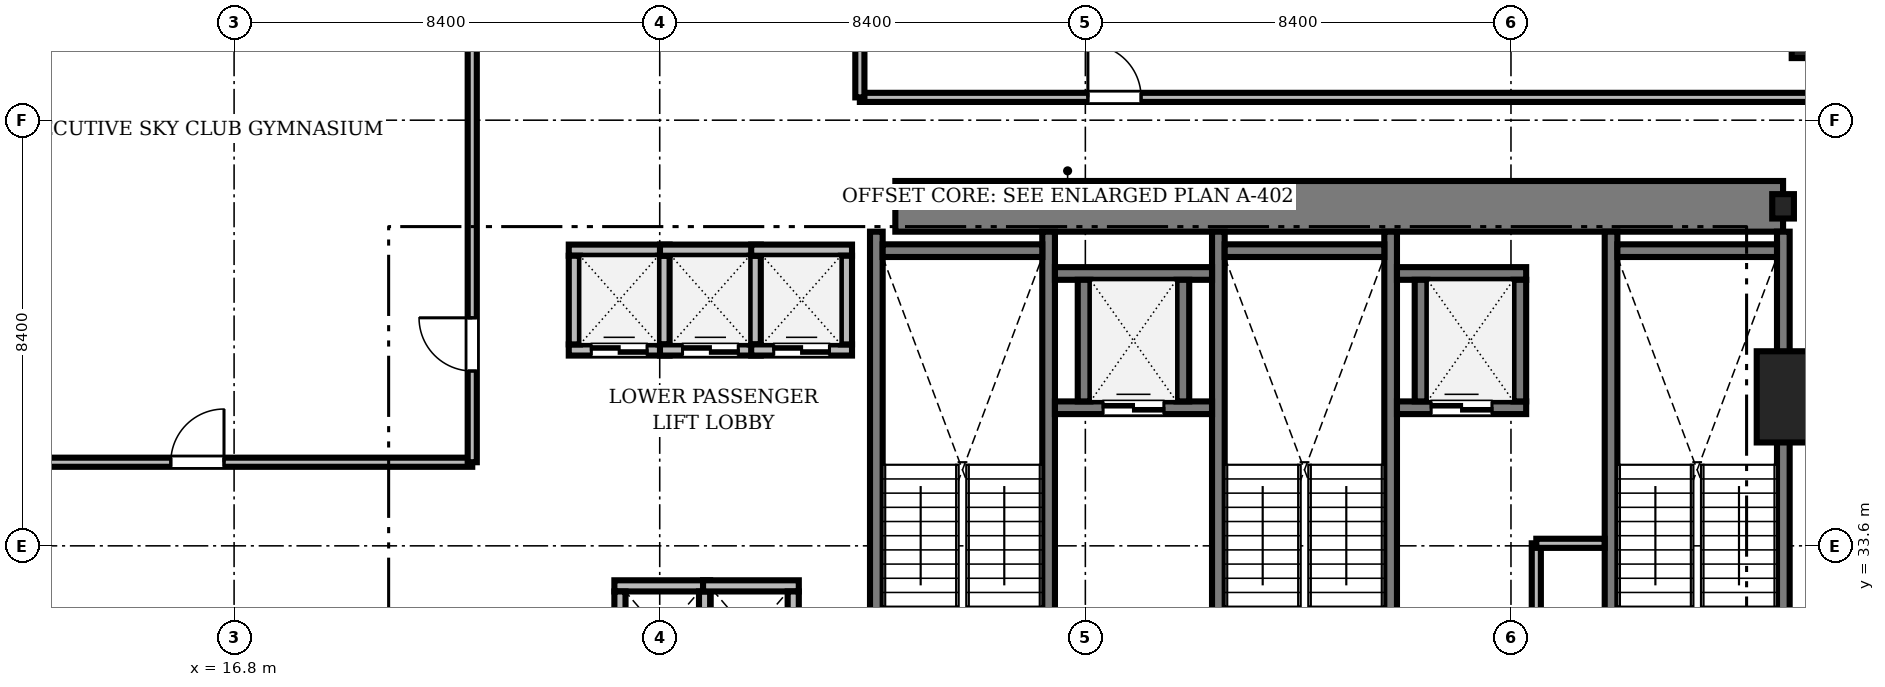
"""IFC4 building model, lengths in metres.
Left out: names, types, materials, properties, quantities, classifications, styles, units other than length and angle.
Written with IfcOpenShell. Run it as: python <this file> out.ifc"""

import sys

from ifc_helpers import new_model, si_unit, direction, frame, frame_2d, origin, origin_2d, place, context, subcontext, project, spatial, rectangle, i_section, extrude, source, transform, mapped, element, fill, save


model = new_model("IFC4")
c1 = context("Model", 3, precision=1e-05, world=origin(), true_north=direction((0.0, 1.0)))
c2 = subcontext(c1, "Body", "Model", "MODEL_VIEW")
j1 = project(units=[si_unit("LENGTHUNIT", "METRE"), si_unit("PLANEANGLEUNIT", "RADIAN")], contexts=[c1])
p1 = place(None, origin())
s1 = spatial("IfcSite", under=j1, at=p1, CompositionType="ELEMENT")
p2 = place(p1, origin())
s2 = spatial("IfcBuilding", under=s1, at=p2, CompositionType="ELEMENT")
p3 = place(p2, frame((0.0, 0.0, 71.4)))
s3 = spatial("IfcBuildingStorey", under=s2, at=p3, CompositionType="ELEMENT", Elevation=71.4)
m1 = source(origin(), c2, "Body", "SweptSolid", [
    extrude(rectangle(XDim=17.52, YDim=1.0, at=frame_2d((8.76, 0.0))), origin(), (0.0, 0.0, 1.0), 3.41),
])
p4 = place(p3, frame((29.85, 40.3, 0.0), z_axis=(0.0, 0.0, 1.0), x_axis=(1.0, 0.0, 0.0)))
e1 = element("IfcWall", 1, at=p4, inside=s3, PredefinedType="SHEAR", context=c2, shape_type="MappedRepresentation", body=[
    mapped(m1, transform((0.0, 0.0, 0.0), scale=1.0)),
])
m2 = source(origin(), c2, "Body", "SweptSolid", [
    extrude(i_section(OverallWidth=0.428, OverallDepth=0.481, WebThickness=0.04, FlangeThickness=0.063, FilletRadius=0.015, at=origin_2d()), origin(), (0.0, 0.0, 1.0), 3.41),
])
p5 = place(p3, frame((47.37, 40.3, 0.0), z_axis=(0.0, 0.0, 1.0), x_axis=(1.0, 0.0, 0.0)))
e2 = element("IfcColumn", 2, at=p5, inside=s3, PredefinedType="COLUMN", context=c2, shape_type="MappedRepresentation", body=[
    mapped(m2, transform((0.0, 0.0, 0.0), scale=1.0)),
])
m3 = source(origin(), c2, "Body", "SweptSolid", [
    extrude(rectangle(XDim=1.8, YDim=1.8, at=origin_2d()), origin(), (0.0, 0.0, 1.0), 3.41),
])
p6 = place(p3, frame((47.75, 36.54, 0.0), z_axis=(0.0, 0.0, 1.0), x_axis=(1.0, 0.0, 0.0)))
e3 = element("IfcColumn", 3, at=p6, inside=s3, PredefinedType="COLUMN", context=c2, shape_type="MappedRepresentation", body=[
    mapped(m3, transform((0.0, 0.0, 0.0), scale=1.0)),
])
m4 = source(origin(), c2, "Body", "SweptSolid", [
    extrude(i_section(OverallWidth=0.419, OverallDepth=0.449, WebThickness=0.031, FlangeThickness=0.048, FilletRadius=0.015, at=origin_2d()), origin(), (0.0, 0.0, 1.0), 3.41),
])
p7 = place(p3, frame((47.75, 43.45, 0.0), z_axis=(0.0, 0.0, 1.0), x_axis=(1.0, 0.0, 0.0)))
e4 = element("IfcColumn", 4, at=p7, inside=s3, PredefinedType="COLUMN", context=c2, shape_type="MappedRepresentation", body=[
    mapped(m4, transform((0.0, 0.0, 0.0), scale=1.0)),
])
m5 = source(origin(), c2, "Body", "SweptSolid", [
    extrude(rectangle(XDim=9.15, YDim=0.25, at=frame_2d((4.575, 0.0))), origin(), (0.0, 0.0, 1.0), 3.45),
])
for number, where, z_axis, x_axis in (
    (5, (29.475, 30.65, 0.0), (0.0, 0.0, 1.0), (0.0, 1.0, 0.0)),
    (6, (32.875, 30.65, 0.0), (0.0, 0.0, 1.0), (0.0, 1.0, 0.0)),
):
    element("IfcWall", number, at=place(p3, frame(where, z_axis=z_axis, x_axis=x_axis)), inside=s3, PredefinedType="SOLIDWALL", context=c2, shape_type="MappedRepresentation", body=[
        mapped(m5, transform((0.0, 0.0, 0.0), scale=1.0)),
    ])
m6 = source(origin(), c2, "Body", "SweptSolid", [
    extrude(rectangle(XDim=3.15, YDim=0.25, at=frame_2d((1.575, 0.0))), origin(), (0.0, 0.0, 1.0), 3.45),
])
p8 = place(p3, frame((29.6, 39.425, 0.0), z_axis=(0.0, 0.0, 1.0), x_axis=(1.0, 0.0, 0.0)))
e7 = element("IfcWall", 7, at=p8, inside=s3, PredefinedType="SOLIDWALL", context=c2, shape_type="MappedRepresentation", body=[
    mapped(m6, transform((0.0, 0.0, 0.0), scale=1.0)),
])
for number, where, z_axis, x_axis in (
    (8, (36.225, 30.65, 0.0), (0.0, 0.0, 1.0), (0.0, 1.0, 0.0)),
    (9, (39.625, 30.65, 0.0), (0.0, 0.0, 1.0), (0.0, 1.0, 0.0)),
):
    element("IfcWall", number, at=place(p3, frame(where, z_axis=z_axis, x_axis=x_axis)), inside=s3, PredefinedType="SOLIDWALL", context=c2, shape_type="MappedRepresentation", body=[
        mapped(m5, transform((0.0, 0.0, 0.0), scale=1.0)),
    ])
p9 = place(p3, frame((36.35, 39.425, 0.0), z_axis=(0.0, 0.0, 1.0), x_axis=(1.0, 0.0, 0.0)))
e10 = element("IfcWall", 10, at=p9, inside=s3, PredefinedType="SOLIDWALL", context=c2, shape_type="MappedRepresentation", body=[
    mapped(m6, transform((0.0, 0.0, 0.0), scale=1.0)),
])
for number, where, z_axis, x_axis in (
    (11, (43.975, 30.65, 0.0), (0.0, 0.0, 1.0), (0.0, 1.0, 0.0)),
    (12, (47.375, 30.65, 0.0), (0.0, 0.0, 1.0), (0.0, 1.0, 0.0)),
):
    element("IfcWall", number, at=place(p3, frame(where, z_axis=z_axis, x_axis=x_axis)), inside=s3, PredefinedType="SOLIDWALL", context=c2, shape_type="MappedRepresentation", body=[
        mapped(m5, transform((0.0, 0.0, 0.0), scale=1.0)),
    ])
p10 = place(p3, frame((44.1, 39.425, 0.0), z_axis=(0.0, 0.0, 1.0), x_axis=(1.0, 0.0, 0.0)))
e13 = element("IfcWall", 13, at=p10, inside=s3, PredefinedType="SOLIDWALL", context=c2, shape_type="MappedRepresentation", body=[
    mapped(m6, transform((0.0, 0.0, 0.0), scale=1.0)),
])
m7 = source(origin(), c2, "Body", "SweptSolid", [
    extrude(rectangle(XDim=1.99, YDim=0.22, at=frame_2d((0.995, 0.0))), origin(), (0.0, 0.0, 1.0), 3.41),
])
p11 = place(p3, frame((23.405, 37.465, 0.0), z_axis=(0.0, 0.0, 1.0), x_axis=(1.0, 0.0, 0.0)))
e14 = element("IfcWall", 14, at=p11, inside=s3, PredefinedType="SOLIDWALL", context=c2, shape_type="MappedRepresentation", body=[
    mapped(m7, transform((0.0, 0.0, 0.0), scale=1.0)),
])
m8 = source(origin(), c2, "Body", "SweptSolid", [
    extrude(rectangle(XDim=1.1, YDim=2.2, at=frame_2d((0.55, 1.1))), frame((0.0, 0.12, 0.0), z_axis=(0.0, -1.0, 0.0), x_axis=(1.0, 0.0, 0.0)), (0.0, 0.0, 1.0), 0.24),
])
p12 = place(p11, frame((0.445, 0.0, 0.0)))
e15 = element("IfcOpeningElement", 15, at=p12, cuts=e14, PredefinedType="OPENING", context=c2, shape_type="MappedRepresentation", body=[
    mapped(m8, transform((0.0, 0.0, 0.0), scale=1.0)),
])
p13 = place(p3, frame((23.405, 39.435, 0.0), z_axis=(0.0, 0.0, 1.0), x_axis=(1.0, 0.0, 0.0)))
e16 = element("IfcWall", 16, at=p13, inside=s3, PredefinedType="SOLIDWALL", context=c2, shape_type="MappedRepresentation", body=[
    mapped(m7, transform((0.0, 0.0, 0.0), scale=1.0)),
])
m9 = source(origin(), c2, "Body", "SweptSolid", [
    extrude(rectangle(XDim=1.75, YDim=0.22, at=frame_2d((0.875, 0.0))), origin(), (0.0, 0.0, 1.0), 3.41),
])
for number, where, z_axis, x_axis in (
    (17, (23.515, 37.575, 0.0), (0.0, 0.0, 1.0), (0.0, 1.0, 0.0)),
    (18, (25.285, 37.575, 0.0), (0.0, 0.0, 1.0), (0.0, 1.0, 0.0)),
):
    element("IfcWall", number, at=place(p3, frame(where, z_axis=z_axis, x_axis=x_axis)), inside=s3, PredefinedType="SOLIDWALL", context=c2, shape_type="MappedRepresentation", body=[
        mapped(m9, transform((0.0, 0.0, 0.0), scale=1.0)),
    ])
p14 = place(p3, frame((25.205, 37.465, 0.0), z_axis=(0.0, 0.0, 1.0), x_axis=(1.0, 0.0, 0.0)))
e19 = element("IfcWall", 19, at=p14, inside=s3, PredefinedType="SOLIDWALL", context=c2, shape_type="MappedRepresentation", body=[
    mapped(m7, transform((0.0, 0.0, 0.0), scale=1.0)),
])
p15 = place(p14, frame((0.445, 0.0, 0.0)))
e20 = element("IfcOpeningElement", 20, at=p15, cuts=e19, PredefinedType="OPENING", context=c2, shape_type="MappedRepresentation", body=[
    mapped(m8, transform((0.0, 0.0, 0.0), scale=1.0)),
])
p16 = place(p3, frame((25.205, 39.435, 0.0), z_axis=(0.0, 0.0, 1.0), x_axis=(1.0, 0.0, 0.0)))
e21 = element("IfcWall", 21, at=p16, inside=s3, PredefinedType="SOLIDWALL", context=c2, shape_type="MappedRepresentation", body=[
    mapped(m7, transform((0.0, 0.0, 0.0), scale=1.0)),
])
p17 = place(p3, frame((27.085, 37.575, 0.0), z_axis=(0.0, 0.0, 1.0), x_axis=(0.0, 1.0, 0.0)))
e22 = element("IfcWall", 22, at=p17, inside=s3, PredefinedType="SOLIDWALL", context=c2, shape_type="MappedRepresentation", body=[
    mapped(m9, transform((0.0, 0.0, 0.0), scale=1.0)),
])
m10 = source(origin(), c2, "Body", "SweptSolid", [
    extrude(rectangle(XDim=1.99, YDim=0.22, at=frame_2d((0.995, 0.0))), origin(), (0.0, 0.0, 1.0), 3.41),
])
p18 = place(p3, frame((27.005, 37.465, 0.0), z_axis=(0.0, 0.0, 1.0), x_axis=(1.0, 0.0, 0.0)))
e23 = element("IfcWall", 23, at=p18, inside=s3, PredefinedType="SOLIDWALL", context=c2, shape_type="MappedRepresentation", body=[
    mapped(m10, transform((0.0, 0.0, 0.0), scale=1.0)),
])
p19 = place(p18, frame((0.445, 0.0, 0.0)))
e24 = element("IfcOpeningElement", 24, at=p19, cuts=e23, PredefinedType="OPENING", context=c2, shape_type="MappedRepresentation", body=[
    mapped(m8, transform((0.0, 0.0, 0.0), scale=1.0)),
])
p20 = place(p3, frame((27.005, 39.435, 0.0), z_axis=(0.0, 0.0, 1.0), x_axis=(1.0, 0.0, 0.0)))
e25 = element("IfcWall", 25, at=p20, inside=s3, PredefinedType="SOLIDWALL", context=c2, shape_type="MappedRepresentation", body=[
    mapped(m10, transform((0.0, 0.0, 0.0), scale=1.0)),
])
p21 = place(p3, frame((28.885, 37.575, 0.0), z_axis=(0.0, 0.0, 1.0), x_axis=(0.0, 1.0, 0.0)))
e26 = element("IfcWall", 26, at=p21, inside=s3, PredefinedType="SOLIDWALL", context=c2, shape_type="MappedRepresentation", body=[
    mapped(m9, transform((0.0, 0.0, 0.0), scale=1.0)),
])
m11 = source(origin(), c2, "Body", "SweptSolid", [
    extrude(rectangle(XDim=3.1, YDim=0.25, at=frame_2d((1.55, 0.0))), origin(), (0.0, 0.0, 1.0), 3.41),
])
p22 = place(p3, frame((33.0, 36.325, 0.0), z_axis=(0.0, 0.0, 1.0), x_axis=(1.0, 0.0, 0.0)))
e27 = element("IfcWall", 27, at=p22, inside=s3, PredefinedType="SOLIDWALL", context=c2, shape_type="MappedRepresentation", body=[
    mapped(m11, transform((0.0, 0.0, 0.0), scale=1.0)),
])
m12 = source(origin(), c2, "Body", "SweptSolid", [
    extrude(rectangle(XDim=1.2, YDim=2.25, at=frame_2d((0.6, 1.125))), frame((0.0, 0.135, 0.0), z_axis=(0.0, -1.0, 0.0), x_axis=(1.0, 0.0, 0.0)), (0.0, 0.0, 1.0), 0.27),
])
p23 = place(p22, frame((0.95, 0.0, 0.0)))
e28 = element("IfcOpeningElement", 28, at=p23, cuts=e27, PredefinedType="OPENING", context=c2, shape_type="MappedRepresentation", body=[
    mapped(m12, transform((0.0, 0.0, 0.0), scale=1.0)),
])
p24 = place(p3, frame((33.0, 38.975, 0.0), z_axis=(0.0, 0.0, 1.0), x_axis=(1.0, 0.0, 0.0)))
e29 = element("IfcWall", 29, at=p24, inside=s3, PredefinedType="SOLIDWALL", context=c2, shape_type="MappedRepresentation", body=[
    mapped(m11, transform((0.0, 0.0, 0.0), scale=1.0)),
])
m13 = source(origin(), c2, "Body", "SweptSolid", [
    extrude(rectangle(XDim=2.4, YDim=0.25, at=frame_2d((1.2, 0.0))), origin(), (0.0, 0.0, 1.0), 3.41),
])
for number, where, z_axis, x_axis in (
    (30, (33.575, 36.45, 0.0), (0.0, 0.0, 1.0), (0.0, 1.0, 0.0)),
    (31, (35.525, 36.45, 0.0), (0.0, 0.0, 1.0), (0.0, 1.0, 0.0)),
):
    element("IfcWall", number, at=place(p3, frame(where, z_axis=z_axis, x_axis=x_axis)), inside=s3, PredefinedType="SOLIDWALL", context=c2, shape_type="MappedRepresentation", body=[
        mapped(m13, transform((0.0, 0.0, 0.0), scale=1.0)),
    ])
m14 = source(origin(), c2, "Body", "SweptSolid", [
    extrude(rectangle(XDim=2.55, YDim=0.25, at=frame_2d((1.275, 0.0))), origin(), (0.0, 0.0, 1.0), 3.41),
])
p25 = place(p3, frame((39.75, 36.325, 0.0), z_axis=(0.0, 0.0, 1.0), x_axis=(1.0, 0.0, 0.0)))
e32 = element("IfcWall", 32, at=p25, inside=s3, PredefinedType="SOLIDWALL", context=c2, shape_type="MappedRepresentation", body=[
    mapped(m14, transform((0.0, 0.0, 0.0), scale=1.0)),
])
p26 = place(p25, frame((0.675, 0.0, 0.0)))
e33 = element("IfcOpeningElement", 33, at=p26, cuts=e32, PredefinedType="OPENING", context=c2, shape_type="MappedRepresentation", body=[
    mapped(m12, transform((0.0, 0.0, 0.0), scale=1.0)),
])
p27 = place(p3, frame((39.75, 38.975, 0.0), z_axis=(0.0, 0.0, 1.0), x_axis=(1.0, 0.0, 0.0)))
e34 = element("IfcWall", 34, at=p27, inside=s3, PredefinedType="SOLIDWALL", context=c2, shape_type="MappedRepresentation", body=[
    mapped(m14, transform((0.0, 0.0, 0.0), scale=1.0)),
])
for number, where, z_axis, x_axis in (
    (35, (40.225, 36.45, 0.0), (0.0, 0.0, 1.0), (0.0, 1.0, 0.0)),
    (36, (42.175, 36.45, 0.0), (0.0, 0.0, 1.0), (0.0, 1.0, 0.0)),
):
    element("IfcWall", number, at=place(p3, frame(where, z_axis=z_axis, x_axis=x_axis)), inside=s3, PredefinedType="SOLIDWALL", context=c2, shape_type="MappedRepresentation", body=[
        mapped(m13, transform((0.0, 0.0, 0.0), scale=1.0)),
    ])
m15 = source(origin(), c2, "Body", "SweptSolid", [
    extrude(rectangle(XDim=1.89, YDim=0.22, at=frame_2d((0.945, 0.0))), origin(), (0.0, 0.0, 1.0), 3.41),
])
p28 = place(p3, frame((24.305, 32.81, 0.0), z_axis=(0.0, 0.0, 1.0), x_axis=(1.0, 0.0, 0.0)))
e37 = element("IfcWall", 37, at=p28, inside=s3, PredefinedType="SOLIDWALL", context=c2, shape_type="MappedRepresentation", body=[
    mapped(m15, transform((0.0, 0.0, 0.0), scale=1.0)),
])
m16 = source(origin(), c2, "Body", "SweptSolid", [
    extrude(rectangle(XDim=1.7, YDim=0.22, at=frame_2d((0.85, 0.0))), origin(), (0.0, 0.0, 1.0), 3.41),
])
for number, where, z_axis, x_axis in (
    (38, (24.415, 31.0, 0.0), (0.0, 0.0, 1.0), (0.0, 1.0, 0.0)),
    (39, (26.085, 31.0, 0.0), (0.0, 0.0, 1.0), (0.0, 1.0, 0.0)),
):
    element("IfcWall", number, at=place(p3, frame(where, z_axis=z_axis, x_axis=x_axis)), inside=s3, PredefinedType="SOLIDWALL", context=c2, shape_type="MappedRepresentation", body=[
        mapped(m16, transform((0.0, 0.0, 0.0), scale=1.0)),
    ])
p29 = place(p3, frame((26.055, 32.81, 0.0), z_axis=(0.0, 0.0, 1.0), x_axis=(1.0, 0.0, 0.0)))
e40 = element("IfcWall", 40, at=p29, inside=s3, PredefinedType="SOLIDWALL", context=c2, shape_type="MappedRepresentation", body=[
    mapped(m15, transform((0.0, 0.0, 0.0), scale=1.0)),
])
p30 = place(p3, frame((27.835, 31.0, 0.0), z_axis=(0.0, 0.0, 1.0), x_axis=(0.0, 1.0, 0.0)))
e41 = element("IfcWall", 41, at=p30, inside=s3, PredefinedType="SOLIDWALL", context=c2, shape_type="MappedRepresentation", body=[
    mapped(m16, transform((0.0, 0.0, 0.0), scale=1.0)),
])
m17 = source(origin(), c2, "Body", "SweptSolid", [
    extrude(rectangle(XDim=19.428, YDim=0.18, at=frame_2d((9.714, 0.0))), origin(), (0.0, 0.0, 1.0), 2.652),
])
p31 = place(p3, frame((29.15, 42.45, 0.0), z_axis=(0.0, 0.0, 1.0), x_axis=(1.0, 0.0, 0.0)))
e42 = element("IfcWall", 42, at=p31, inside=s3, PredefinedType="PARTITIONING", context=c2, shape_type="MappedRepresentation", body=[
    mapped(m17, transform((0.0, 0.0, 0.0), scale=1.0)),
])
m18 = source(origin(), c2, "Body", "SweptSolid", [
    extrude(rectangle(XDim=1.05, YDim=2.2, at=frame_2d((0.525, 1.1))), frame((0.0, 0.1, 0.0), z_axis=(0.0, -1.0, 0.0), x_axis=(1.0, 0.0, 0.0)), (0.0, 0.0, 1.0), 0.2),
])
p32 = place(p31, frame((4.5, 0.0, 0.0)))
e43 = element("IfcOpeningElement", 43, at=p32, cuts=e42, PredefinedType="OPENING", context=c2, shape_type="MappedRepresentation", body=[
    mapped(m18, transform((0.0, 0.0, 0.0), scale=1.0)),
])
m19 = source(origin(), c2, "Body", "SweptSolid", [
    extrude(rectangle(XDim=19.078, YDim=0.18, at=frame_2d((9.539, 0.0))), origin(), (0.0, 0.0, 1.0), 2.652),
])
p33 = place(p3, frame((2.422, 35.25, 0.0), z_axis=(0.0, 0.0, 1.0), x_axis=(1.0, 0.0, 0.0)))
e44 = element("IfcWall", 44, at=p33, inside=s3, PredefinedType="PARTITIONING", context=c2, shape_type="MappedRepresentation", body=[
    mapped(m19, transform((0.0, 0.0, 0.0), scale=1.0)),
])
p34 = place(p33, frame((13.129, 0.0, 0.0)))
e45 = element("IfcOpeningElement", 45, at=p34, cuts=e44, PredefinedType="OPENING", context=c2, shape_type="MappedRepresentation", body=[
    mapped(m18, transform((0.0, 0.0, 0.0), scale=1.0)),
])
m20 = source(origin(), c2, "Body", "SweptSolid", [
    extrude(rectangle(XDim=13.028, YDim=0.18, at=frame_2d((6.514, 0.0))), origin(), (0.0, 0.0, 1.0), 2.652),
])
p35 = place(p3, frame((21.5, 35.25, 0.0), z_axis=(0.0, 0.0, 1.0), x_axis=(0.0, 1.0, 0.0)))
e46 = element("IfcWall", 46, at=p35, inside=s3, PredefinedType="PARTITIONING", context=c2, shape_type="MappedRepresentation", body=[
    mapped(m20, transform((0.0, 0.0, 0.0), scale=1.0)),
])
p36 = place(p35, frame((1.8, 0.0, 0.0)))
e47 = element("IfcOpeningElement", 47, at=p36, cuts=e46, PredefinedType="OPENING", context=c2, shape_type="MappedRepresentation", body=[
    mapped(m18, transform((0.0, 0.0, 0.0), scale=1.0)),
])
m21 = source(origin(), c2, "Body", "SweptSolid", [
    extrude(rectangle(XDim=5.828, YDim=0.18, at=frame_2d((2.914, 0.0))), origin(), (0.0, 0.0, 1.0), 2.652),
])
p37 = place(p3, frame((29.15, 42.45, 0.0), z_axis=(0.0, 0.0, 1.0), x_axis=(0.0, 1.0, 0.0)))
e48 = element("IfcWall", 48, at=p37, inside=s3, PredefinedType="PARTITIONING", context=c2, shape_type="MappedRepresentation", body=[
    mapped(m21, transform((0.0, 0.0, 0.0), scale=1.0)),
])
m22 = source(origin(), c2, "Body", "SweptSolid", [
    extrude(rectangle(XDim=2.758, YDim=0.18, at=frame_2d((1.379, 0.0))), origin(), (0.0, 0.0, 1.0), 3.41),
])
p38 = place(p3, frame((42.5, 30.892, 0.0), z_axis=(0.0, 0.0, 1.0), x_axis=(0.0, 1.0, 0.0)))
e49 = element("IfcWall", 49, at=p38, inside=s3, PredefinedType="PARTITIONING", context=c2, shape_type="MappedRepresentation", body=[
    mapped(m22, transform((0.0, 0.0, 0.0), scale=1.0)),
])
m23 = source(origin(), c2, "Body", "SweptSolid", [
    extrude(rectangle(XDim=1.348, YDim=0.18, at=frame_2d((0.674, 0.0))), origin(), (0.0, 0.0, 1.0), 3.41),
])
p39 = place(p3, frame((42.5, 33.65, 0.0), z_axis=(0.0, 0.0, 1.0), x_axis=(1.0, 0.0, 0.0)))
e50 = element("IfcWall", 50, at=p39, inside=s3, PredefinedType="PARTITIONING", context=c2, shape_type="MappedRepresentation", body=[
    mapped(m23, transform((0.0, 0.0, 0.0), scale=1.0)),
])
m24 = source(origin(), c2, "Body", "SweptSolid", [
    extrude(rectangle(XDim=1.1, YDim=2.2, at=frame_2d((0.55, 1.1))), frame((0.0, 0.025, 0.0), z_axis=(0.0, -1.0, 0.0), x_axis=(1.0, 0.0, 0.0)), (0.0, 0.0, 1.0), 0.05),
])
p40 = place(p12, origin())
e51 = element("IfcDoor", 51, at=p40, inside=s3, OperationType="DOUBLE_DOOR_SLIDING", PredefinedType="DOOR", context=c2, shape_type="MappedRepresentation", body=[
    mapped(m24, transform((0.0, 0.0, 0.0), scale=1.0)),
])
fill(e15, e51)
p41 = place(p15, origin())
e52 = element("IfcDoor", 52, at=p41, inside=s3, OperationType="DOUBLE_DOOR_SLIDING", PredefinedType="DOOR", context=c2, shape_type="MappedRepresentation", body=[
    mapped(m24, transform((0.0, 0.0, 0.0), scale=1.0)),
])
fill(e20, e52)
p42 = place(p19, origin())
e53 = element("IfcDoor", 53, at=p42, inside=s3, OperationType="DOUBLE_DOOR_SLIDING", PredefinedType="DOOR", context=c2, shape_type="MappedRepresentation", body=[
    mapped(m24, transform((0.0, 0.0, 0.0), scale=1.0)),
])
fill(e24, e53)
m25 = source(origin(), c2, "Body", "SweptSolid", [
    extrude(rectangle(XDim=1.2, YDim=2.25, at=frame_2d((0.6, 1.125))), frame((0.0, 0.025, 0.0), z_axis=(0.0, -1.0, 0.0), x_axis=(1.0, 0.0, 0.0)), (0.0, 0.0, 1.0), 0.05),
])
p43 = place(p23, origin())
e54 = element("IfcDoor", 54, at=p43, inside=s3, OperationType="DOUBLE_DOOR_SLIDING", PredefinedType="DOOR", context=c2, shape_type="MappedRepresentation", body=[
    mapped(m25, transform((0.0, 0.0, 0.0), scale=1.0)),
])
fill(e28, e54)
p44 = place(p26, origin())
e55 = element("IfcDoor", 55, at=p44, inside=s3, OperationType="DOUBLE_DOOR_SLIDING", PredefinedType="DOOR", context=c2, shape_type="MappedRepresentation", body=[
    mapped(m25, transform((0.0, 0.0, 0.0), scale=1.0)),
])
fill(e33, e55)
m26 = source(origin(), c2, "Body", "SweptSolid", [
    extrude(rectangle(XDim=1.05, YDim=2.2, at=frame_2d((0.525, 1.1))), frame((0.0, 0.025, 0.0), z_axis=(0.0, -1.0, 0.0), x_axis=(1.0, 0.0, 0.0)), (0.0, 0.0, 1.0), 0.05),
])
p45 = place(p32, origin())
e56 = element("IfcDoor", 56, at=p45, inside=s3, OperationType="SINGLE_SWING_LEFT", PredefinedType="DOOR", context=c2, shape_type="MappedRepresentation", body=[
    mapped(m26, transform((0.0, 0.0, 0.0), scale=1.0)),
])
fill(e43, e56)
p46 = place(p34, origin())
e57 = element("IfcDoor", 57, at=p46, inside=s3, OperationType="SINGLE_SWING_RIGHT", PredefinedType="DOOR", context=c2, shape_type="MappedRepresentation", body=[
    mapped(m26, transform((0.0, 0.0, 0.0), scale=1.0)),
])
fill(e45, e57)
p47 = place(p36, origin())
e58 = element("IfcDoor", 58, at=p47, inside=s3, OperationType="SINGLE_SWING_RIGHT", PredefinedType="DOOR", context=c2, shape_type="MappedRepresentation", body=[
    mapped(m26, transform((0.0, 0.0, 0.0), scale=1.0)),
])
fill(e47, e58)
save(model, sys.argv[1])
